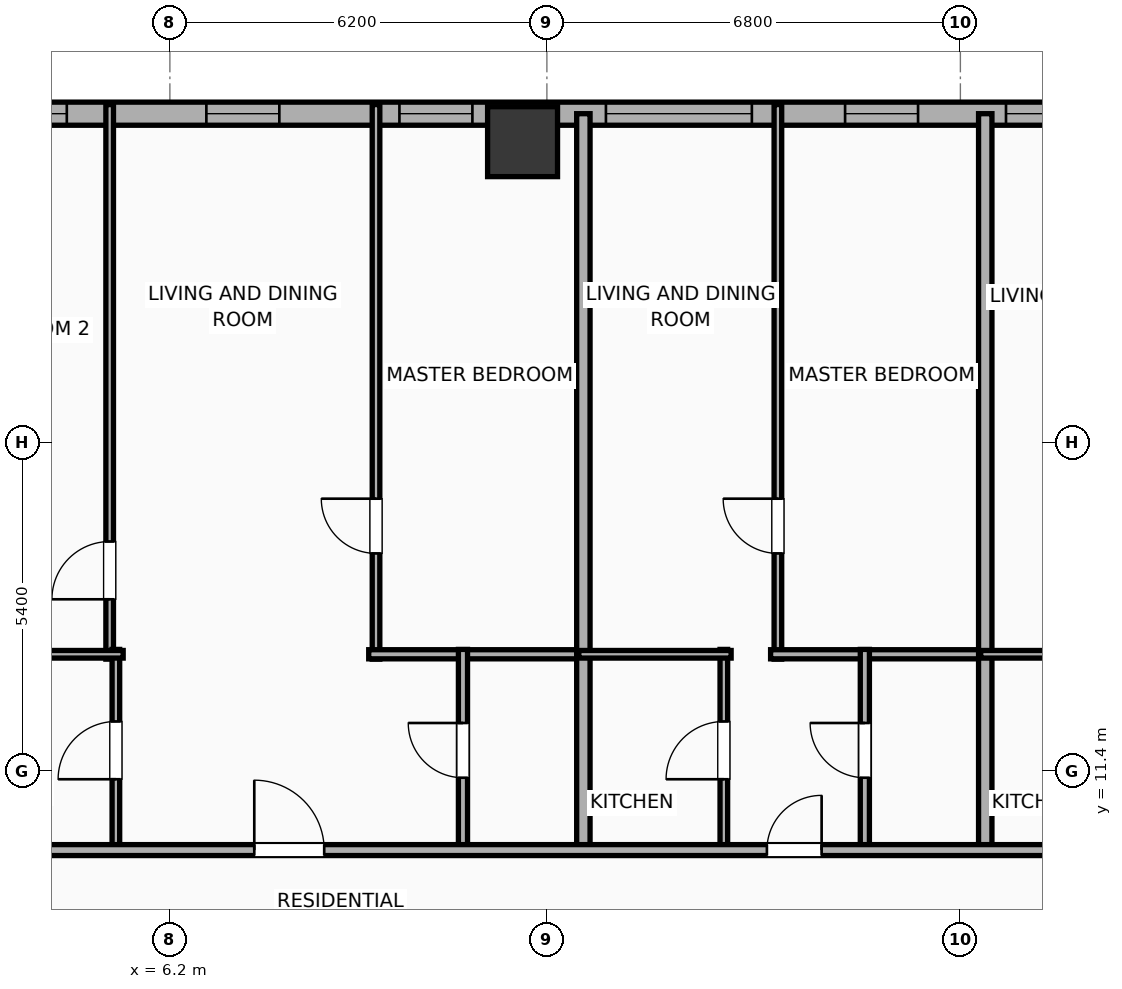
"""IFC4 building model, lengths in metres.
Left out: names, types, materials, properties, quantities, classifications, styles, units other than length and angle.
Written with IfcOpenShell. Run it as: python <this file> out.ifc"""

import sys

from ifc_helpers import new_model, si_unit, direction, frame, frame_2d, origin, origin_2d, place, context, subcontext, project, spatial, rectangle, hollow_rectangle, extrude, element, fill, save


model = new_model("IFC4")
c1 = context("Model", 3, precision=1e-05, world=origin(), true_north=direction((0.0, 1.0)))
c2 = subcontext(c1, "Body", "Model", "MODEL_VIEW")
j1 = project(units=[si_unit("LENGTHUNIT", "METRE"), si_unit("PLANEANGLEUNIT", "RADIAN")], contexts=[c1])
p1 = place(None, origin())
s1 = spatial("IfcSite", under=j1, at=p1, CompositionType="ELEMENT")
p2 = place(p1, origin())
s2 = spatial("IfcBuilding", under=s1, at=p2, CompositionType="ELEMENT")
p3 = place(p2, frame((0.0, 0.0, 41.6)))
s3 = spatial("IfcBuildingStorey", under=s2, at=p3, CompositionType="ELEMENT", Elevation=41.6)
p4 = place(p3, frame((12.0, 21.75, 0.0), z_axis=(0.0, 0.0, 1.0), x_axis=(1.0, 0.0, 0.0)))
e1 = element("IfcColumn", 1, at=p4, inside=s3, PredefinedType="COLUMN", context=c2, shape_type="SweptSolid", body=[
    extrude(hollow_rectangle(XDim=1.15, YDim=1.15, WallThickness=0.04, at=origin_2d()), origin(), (0.0, 0.0, 1.0), 3.9),
])
p5 = place(p3, frame((-29.581, 22.21, 0.0), z_axis=(0.0, 0.0, 1.0), x_axis=(1.0, 0.0, 0.0)))
e2 = element("IfcWall", 2, at=p5, inside=s3, PredefinedType="ELEMENTEDWALL", context=c2, shape_type="SweptSolid", body=[
    extrude(rectangle(XDim=51.963, YDim=0.38, at=frame_2d((25.981, 0.0))), origin(), (0.0, 0.0, 1.0), 3.65),
])
p6 = place(p5, frame((25.631, 0.0, 0.75)))
e3 = element("IfcOpeningElement", 3, at=p6, cuts=e2, PredefinedType="OPENING", context=c2, shape_type="SweptSolid", body=[
    extrude(rectangle(XDim=2.4, YDim=2.1, at=frame_2d((1.2, 1.05))), frame((0.0, 0.2, 0.0), z_axis=(0.0, -1.0, 0.0), x_axis=(1.0, 0.0, 0.0)), (0.0, 0.0, 1.0), 0.4),
])
p7 = place(p5, frame((42.952, 0.0, 0.75)))
e4 = element("IfcOpeningElement", 4, at=p7, cuts=e2, PredefinedType="OPENING", context=c2, shape_type="SweptSolid", body=[
    extrude(rectangle(XDim=2.4, YDim=2.1, at=frame_2d((1.2, 1.05))), frame((0.0, 0.2, 0.0), z_axis=(0.0, -1.0, 0.0), x_axis=(1.0, 0.0, 0.0)), (0.0, 0.0, 1.0), 0.4),
])
p8 = place(p5, frame((1.731, 0.0, 0.75)))
e5 = element("IfcOpeningElement", 5, at=p8, cuts=e2, PredefinedType="OPENING", context=c2, shape_type="SweptSolid", body=[
    extrude(rectangle(XDim=1.2, YDim=2.05, at=frame_2d((0.6, 1.025))), frame((0.0, 0.2, 0.0), z_axis=(0.0, -1.0, 0.0), x_axis=(1.0, 0.0, 0.0)), (0.0, 0.0, 1.0), 0.4),
])
p9 = place(p5, frame((5.272, 0.0, 0.75)))
e6 = element("IfcOpeningElement", 6, at=p9, cuts=e2, PredefinedType="OPENING", context=c2, shape_type="SweptSolid", body=[
    extrude(rectangle(XDim=1.2, YDim=2.05, at=frame_2d((0.6, 1.025))), frame((0.0, 0.2, 0.0), z_axis=(0.0, -1.0, 0.0), x_axis=(1.0, 0.0, 0.0)), (0.0, 0.0, 1.0), 0.4),
])
p10 = place(p5, frame((8.356, 0.0, 0.75)))
e7 = element("IfcOpeningElement", 7, at=p10, cuts=e2, PredefinedType="OPENING", context=c2, shape_type="SweptSolid", body=[
    extrude(rectangle(XDim=1.2, YDim=2.05, at=frame_2d((0.6, 1.025))), frame((0.0, 0.2, 0.0), z_axis=(0.0, -1.0, 0.0), x_axis=(1.0, 0.0, 0.0)), (0.0, 0.0, 1.0), 0.4),
])
p11 = place(p5, frame((15.632, 0.0, 0.75)))
e8 = element("IfcOpeningElement", 8, at=p11, cuts=e2, PredefinedType="OPENING", context=c2, shape_type="SweptSolid", body=[
    extrude(rectangle(XDim=1.2, YDim=2.05, at=frame_2d((0.6, 1.025))), frame((0.0, 0.2, 0.0), z_axis=(0.0, -1.0, 0.0), x_axis=(1.0, 0.0, 0.0)), (0.0, 0.0, 1.0), 0.4),
])
p12 = place(p5, frame((12.137, 0.0, 0.75)))
e9 = element("IfcOpeningElement", 9, at=p12, cuts=e2, PredefinedType="OPENING", context=c2, shape_type="SweptSolid", body=[
    extrude(rectangle(XDim=1.2, YDim=2.05, at=frame_2d((0.6, 1.025))), frame((0.0, 0.2, 0.0), z_axis=(0.0, -1.0, 0.0), x_axis=(1.0, 0.0, 0.0)), (0.0, 0.0, 1.0), 0.4),
])
p13 = place(p5, frame((18.756, 0.0, 0.75)))
e10 = element("IfcOpeningElement", 10, at=p13, cuts=e2, PredefinedType="OPENING", context=c2, shape_type="SweptSolid", body=[
    extrude(rectangle(XDim=1.2, YDim=2.05, at=frame_2d((0.6, 1.025))), frame((0.0, 0.2, 0.0), z_axis=(0.0, -1.0, 0.0), x_axis=(1.0, 0.0, 0.0)), (0.0, 0.0, 1.0), 0.4),
])
p14 = place(p5, frame((22.907, 0.0, 0.75)))
e11 = element("IfcOpeningElement", 11, at=p14, cuts=e2, PredefinedType="OPENING", context=c2, shape_type="SweptSolid", body=[
    extrude(rectangle(XDim=1.2, YDim=2.05, at=frame_2d((0.6, 1.025))), frame((0.0, 0.2, 0.0), z_axis=(0.0, -1.0, 0.0), x_axis=(1.0, 0.0, 0.0)), (0.0, 0.0, 1.0), 0.4),
])
p15 = place(p5, frame((36.381, 0.0, 0.75)))
e12 = element("IfcOpeningElement", 12, at=p15, cuts=e2, PredefinedType="OPENING", context=c2, shape_type="SweptSolid", body=[
    extrude(rectangle(XDim=1.2, YDim=2.05, at=frame_2d((0.6, 1.025))), frame((0.0, 0.2, 0.0), z_axis=(0.0, -1.0, 0.0), x_axis=(1.0, 0.0, 0.0)), (0.0, 0.0, 1.0), 0.4),
])
p16 = place(p5, frame((32.886, 0.0, 0.75)))
e13 = element("IfcOpeningElement", 13, at=p16, cuts=e2, PredefinedType="OPENING", context=c2, shape_type="SweptSolid", body=[
    extrude(rectangle(XDim=1.2, YDim=2.05, at=frame_2d((0.6, 1.025))), frame((0.0, 0.2, 0.0), z_axis=(0.0, -1.0, 0.0), x_axis=(1.0, 0.0, 0.0)), (0.0, 0.0, 1.0), 0.4),
])
p17 = place(p5, frame((39.556, 0.0, 0.75)))
e14 = element("IfcOpeningElement", 14, at=p17, cuts=e2, PredefinedType="OPENING", context=c2, shape_type="SweptSolid", body=[
    extrude(rectangle(XDim=1.2, YDim=2.05, at=frame_2d((0.6, 1.025))), frame((0.0, 0.2, 0.0), z_axis=(0.0, -1.0, 0.0), x_axis=(1.0, 0.0, 0.0)), (0.0, 0.0, 1.0), 0.4),
])
p18 = place(p5, frame((46.885, 0.0, 0.75)))
e15 = element("IfcOpeningElement", 15, at=p18, cuts=e2, PredefinedType="OPENING", context=c2, shape_type="SweptSolid", body=[
    extrude(rectangle(XDim=1.2, YDim=2.05, at=frame_2d((0.6, 1.025))), frame((0.0, 0.2, 0.0), z_axis=(0.0, -1.0, 0.0), x_axis=(1.0, 0.0, 0.0)), (0.0, 0.0, 1.0), 0.4),
])
p19 = place(p5, frame((49.531, 0.0, 0.75)))
e16 = element("IfcOpeningElement", 16, at=p19, cuts=e2, PredefinedType="OPENING", context=c2, shape_type="SweptSolid", body=[
    extrude(rectangle(XDim=1.2, YDim=2.05, at=frame_2d((0.6, 1.025))), frame((0.0, 0.2, 0.0), z_axis=(0.0, -1.0, 0.0), x_axis=(1.0, 0.0, 0.0)), (0.0, 0.0, 1.0), 0.4),
])
p20 = place(p3, frame((5.21, 13.24, 0.0), z_axis=(0.0, 0.0, 1.0), x_axis=(0.0, 1.0, 0.0)))
e17 = element("IfcWall", 17, at=p20, inside=s3, PredefinedType="PARTITIONING", context=c2, shape_type="SweptSolid", body=[
    extrude(rectangle(XDim=9.12, YDim=0.125, at=frame_2d((4.56, 0.0))), origin(), (0.0, 0.0, 1.0), 3.65),
])
p21 = place(p20, frame((0.984, 0.0, 0.0)))
e18 = element("IfcOpeningElement", 18, at=p21, cuts=e17, PredefinedType="OPENING", context=c2, shape_type="SweptSolid", body=[
    extrude(rectangle(XDim=0.95, YDim=2.05, at=frame_2d((0.475, 1.025))), frame((0.0, 0.073, 0.0), z_axis=(0.0, -1.0, 0.0), x_axis=(1.0, 0.0, 0.0)), (0.0, 0.0, 1.0), 0.145),
])
p22 = place(p3, frame((9.59, 13.24, 0.0), z_axis=(0.0, 0.0, 1.0), x_axis=(0.0, 1.0, 0.0)))
e19 = element("IfcWall", 19, at=p22, inside=s3, PredefinedType="PARTITIONING", context=c2, shape_type="SweptSolid", body=[
    extrude(rectangle(XDim=9.12, YDim=0.125, at=frame_2d((4.56, 0.0))), origin(), (0.0, 0.0, 1.0), 3.65),
])
p23 = place(p22, frame((1.739, 0.0, 0.0)))
e20 = element("IfcOpeningElement", 20, at=p23, cuts=e19, PredefinedType="OPENING", context=c2, shape_type="SweptSolid", body=[
    extrude(rectangle(XDim=0.9, YDim=2.05, at=frame_2d((0.45, 1.025))), frame((0.0, 0.073, 0.0), z_axis=(0.0, -1.0, 0.0), x_axis=(1.0, 0.0, 0.0)), (0.0, 0.0, 1.0), 0.145),
])
p24 = place(p3, frame((9.47, 13.32, 0.0), z_axis=(0.0, 0.0, 1.0), x_axis=(1.0, 0.0, 0.0)))
e21 = element("IfcWall", 21, at=p24, inside=s3, PredefinedType="PLUMBINGWALL", context=c2, shape_type="SweptSolid", body=[
    extrude(rectangle(XDim=3.605, YDim=0.15, at=frame_2d((1.802, 0.0))), origin(), (0.0, 0.0, 1.0), 3.65),
])
p25 = place(p3, frame((5.312, 10.08, 0.0), z_axis=(0.0, 0.0, 1.0), x_axis=(0.0, 1.0, 0.0)))
e22 = element("IfcWall", 22, at=p25, inside=s3, PredefinedType="PARTITIONING", context=c2, shape_type="SweptSolid", body=[
    extrude(rectangle(XDim=3.32, YDim=0.125, at=frame_2d((1.66, 0.0))), origin(), (0.0, 0.0, 1.0), 3.65),
])
p26 = place(p25, frame((1.185, 0.0, 0.0)))
e23 = element("IfcOpeningElement", 23, at=p26, cuts=e22, PredefinedType="OPENING", context=c2, shape_type="SweptSolid", body=[
    extrude(rectangle(XDim=0.95, YDim=2.05, at=frame_2d((0.475, 1.025))), frame((0.0, 0.073, 0.0), z_axis=(0.0, -1.0, 0.0), x_axis=(1.0, 0.0, 0.0)), (0.0, 0.0, 1.0), 0.145),
])
p27 = place(p3, frame((2.34, 13.32, 0.0), z_axis=(0.0, 0.0, 1.0), x_axis=(1.0, 0.0, 0.0)))
e24 = element("IfcWall", 24, at=p27, inside=s3, PredefinedType="PARTITIONING", context=c2, shape_type="SweptSolid", body=[
    extrude(rectangle(XDim=3.092, YDim=0.125, at=frame_2d((1.546, 0.0))), origin(), (0.0, 0.0, 1.0), 3.65),
])
p28 = place(p3, frame((11.02, 10.08, 0.0), z_axis=(0.0, 0.0, 1.0), x_axis=(0.0, 1.0, 0.0)))
e25 = element("IfcWall", 25, at=p28, inside=s3, PredefinedType="PLUMBINGWALL", context=c2, shape_type="SweptSolid", body=[
    extrude(rectangle(XDim=3.32, YDim=0.15, at=frame_2d((1.66, 0.0))), origin(), (0.0, 0.0, 1.0), 3.65),
])
p29 = place(p28, frame((1.21, 0.0, 0.0)))
e26 = element("IfcOpeningElement", 26, at=p29, cuts=e25, PredefinedType="OPENING", context=c2, shape_type="SweptSolid", body=[
    extrude(rectangle(XDim=0.9, YDim=2.05, at=frame_2d((0.45, 1.025))), frame((0.0, 0.085, 0.0), z_axis=(0.0, -1.0, 0.0), x_axis=(1.0, 0.0, 0.0)), (0.0, 0.0, 1.0), 0.17),
])
p30 = place(p3, frame((13.0, 10.02, 0.0), z_axis=(0.0, 0.0, 1.0), x_axis=(0.0, 1.0, 0.0)))
e27 = element("IfcWall", 27, at=p30, inside=s3, PredefinedType="PARTITIONING", context=c2, shape_type="SweptSolid", body=[
    extrude(rectangle(XDim=12.19, YDim=0.22, at=frame_2d((6.095, 0.0))), origin(), (0.0, 0.0, 1.0), 3.65),
])
p31 = place(p3, frame((16.199, 13.24, 0.0), z_axis=(0.0, 0.0, 1.0), x_axis=(0.0, 1.0, 0.0)))
e28 = element("IfcWall", 28, at=p31, inside=s3, PredefinedType="PARTITIONING", context=c2, shape_type="SweptSolid", body=[
    extrude(rectangle(XDim=9.12, YDim=0.125, at=frame_2d((4.56, 0.0))), origin(), (0.0, 0.0, 1.0), 3.65),
])
p32 = place(p31, frame((1.739, 0.0, 0.0)))
e29 = element("IfcOpeningElement", 29, at=p32, cuts=e28, PredefinedType="OPENING", context=c2, shape_type="SweptSolid", body=[
    extrude(rectangle(XDim=0.9, YDim=2.05, at=frame_2d((0.45, 1.025))), frame((0.0, 0.073, 0.0), z_axis=(0.0, -1.0, 0.0), x_axis=(1.0, 0.0, 0.0)), (0.0, 0.0, 1.0), 0.145),
])
p33 = place(p3, frame((16.079, 13.32, 0.0), z_axis=(0.0, 0.0, 1.0), x_axis=(1.0, 0.0, 0.0)))
e30 = element("IfcWall", 30, at=p33, inside=s3, PredefinedType="PLUMBINGWALL", context=c2, shape_type="SweptSolid", body=[
    extrude(rectangle(XDim=3.605, YDim=0.15, at=frame_2d((1.802, 0.0))), origin(), (0.0, 0.0, 1.0), 3.65),
])
p34 = place(p3, frame((15.31, 10.08, 0.0), z_axis=(0.0, 0.0, 1.0), x_axis=(0.0, 1.0, 0.0)))
e31 = element("IfcWall", 31, at=p34, inside=s3, PredefinedType="PARTITIONING", context=c2, shape_type="SweptSolid", body=[
    extrude(rectangle(XDim=3.32, YDim=0.125, at=frame_2d((1.66, 0.0))), origin(), (0.0, 0.0, 1.0), 3.65),
])
p35 = place(p34, frame((1.185, 0.0, 0.0)))
e32 = element("IfcOpeningElement", 32, at=p35, cuts=e31, PredefinedType="OPENING", context=c2, shape_type="SweptSolid", body=[
    extrude(rectangle(XDim=0.95, YDim=2.05, at=frame_2d((0.475, 1.025))), frame((0.0, 0.073, 0.0), z_axis=(0.0, -1.0, 0.0), x_axis=(1.0, 0.0, 0.0)), (0.0, 0.0, 1.0), 0.145),
])
p36 = place(p3, frame((12.925, 13.32, 0.0), z_axis=(0.0, 0.0, 1.0), x_axis=(1.0, 0.0, 0.0)))
e33 = element("IfcWall", 33, at=p36, inside=s3, PredefinedType="PARTITIONING", context=c2, shape_type="SweptSolid", body=[
    extrude(rectangle(XDim=2.505, YDim=0.125, at=frame_2d((1.252, 0.0))), origin(), (0.0, 0.0, 1.0), 3.65),
])
p37 = place(p3, frame((17.629, 10.08, 0.0), z_axis=(0.0, 0.0, 1.0), x_axis=(0.0, 1.0, 0.0)))
e34 = element("IfcWall", 34, at=p37, inside=s3, PredefinedType="PLUMBINGWALL", context=c2, shape_type="SweptSolid", body=[
    extrude(rectangle(XDim=3.32, YDim=0.15, at=frame_2d((1.66, 0.0))), origin(), (0.0, 0.0, 1.0), 3.65),
])
p38 = place(p37, frame((1.21, 0.0, 0.0)))
e35 = element("IfcOpeningElement", 35, at=p38, cuts=e34, PredefinedType="OPENING", context=c2, shape_type="SweptSolid", body=[
    extrude(rectangle(XDim=0.9, YDim=2.05, at=frame_2d((0.45, 1.025))), frame((0.0, 0.085, 0.0), z_axis=(0.0, -1.0, 0.0), x_axis=(1.0, 0.0, 0.0)), (0.0, 0.0, 1.0), 0.17),
])
p39 = place(p3, frame((19.609, 10.02, 0.0), z_axis=(0.0, 0.0, 1.0), x_axis=(0.0, 1.0, 0.0)))
e36 = element("IfcWall", 36, at=p39, inside=s3, PredefinedType="PARTITIONING", context=c2, shape_type="SweptSolid", body=[
    extrude(rectangle(XDim=12.19, YDim=0.22, at=frame_2d((6.095, 0.0))), origin(), (0.0, 0.0, 1.0), 3.65),
])
p40 = place(p3, frame((19.534, 13.32, 0.0), z_axis=(0.0, 0.0, 1.0), x_axis=(1.0, 0.0, 0.0)))
e37 = element("IfcWall", 37, at=p40, inside=s3, PredefinedType="PARTITIONING", context=c2, shape_type="SweptSolid", body=[
    extrude(rectangle(XDim=2.505, YDim=0.125, at=frame_2d((1.252, 0.0))), origin(), (0.0, 0.0, 1.0), 3.65),
])
p41 = place(p3, frame((-33.41, 10.1, 0.0), z_axis=(0.0, 0.0, 1.0), x_axis=(1.0, 0.0, 0.0)))
e38 = element("IfcWall", 38, at=p41, inside=s3, PredefinedType="PARTITIONING", context=c2, shape_type="SweptSolid", body=[
    extrude(rectangle(XDim=59.62, YDim=0.18, at=frame_2d((29.81, 0.0))), origin(), (0.0, 0.0, 1.0), 3.65),
])
p42 = place(p41, frame((3.354, 0.0, 0.0)))
e39 = element("IfcOpeningElement", 39, at=p42, cuts=e38, PredefinedType="OPENING", context=c2, shape_type="SweptSolid", body=[
    extrude(rectangle(XDim=1.15, YDim=2.05, at=frame_2d((0.575, 1.025))), frame((0.0, 0.1, 0.0), z_axis=(0.0, -1.0, 0.0), x_axis=(1.0, 0.0, 0.0)), (0.0, 0.0, 1.0), 0.2),
])
p43 = place(p41, frame((10.997, 0.0, 0.0)))
e40 = element("IfcOpeningElement", 40, at=p43, cuts=e38, PredefinedType="OPENING", context=c2, shape_type="SweptSolid", body=[
    extrude(rectangle(XDim=1.15, YDim=2.05, at=frame_2d((0.575, 1.025))), frame((0.0, 0.1, 0.0), z_axis=(0.0, -1.0, 0.0), x_axis=(1.0, 0.0, 0.0)), (0.0, 0.0, 1.0), 0.2),
])
p44 = place(p41, frame((20.232, 0.0, 0.0)))
e41 = element("IfcOpeningElement", 41, at=p44, cuts=e38, PredefinedType="OPENING", context=c2, shape_type="SweptSolid", body=[
    extrude(rectangle(XDim=1.15, YDim=2.05, at=frame_2d((0.575, 1.025))), frame((0.0, 0.1, 0.0), z_axis=(0.0, -1.0, 0.0), x_axis=(1.0, 0.0, 0.0)), (0.0, 0.0, 1.0), 0.2),
])
p45 = place(p41, frame((30.38, 0.0, 0.0)))
e42 = element("IfcOpeningElement", 42, at=p45, cuts=e38, PredefinedType="OPENING", context=c2, shape_type="SweptSolid", body=[
    extrude(rectangle(XDim=1.15, YDim=2.05, at=frame_2d((0.575, 1.025))), frame((0.0, 0.1, 0.0), z_axis=(0.0, -1.0, 0.0), x_axis=(1.0, 0.0, 0.0)), (0.0, 0.0, 1.0), 0.2),
])
p46 = place(p41, frame((40.998, 0.0, 0.0)))
e43 = element("IfcOpeningElement", 43, at=p46, cuts=e38, PredefinedType="OPENING", context=c2, shape_type="SweptSolid", body=[
    extrude(rectangle(XDim=1.15, YDim=2.05, at=frame_2d((0.575, 1.025))), frame((0.0, 0.1, 0.0), z_axis=(0.0, -1.0, 0.0), x_axis=(1.0, 0.0, 0.0)), (0.0, 0.0, 1.0), 0.2),
])
p47 = place(p41, frame((49.428, 0.0, 0.0)))
e44 = element("IfcOpeningElement", 44, at=p47, cuts=e38, PredefinedType="OPENING", context=c2, shape_type="SweptSolid", body=[
    extrude(rectangle(XDim=0.9, YDim=2.05, at=frame_2d((0.45, 1.025))), frame((0.0, 0.1, 0.0), z_axis=(0.0, -1.0, 0.0), x_axis=(1.0, 0.0, 0.0)), (0.0, 0.0, 1.0), 0.2),
])
p48 = place(p41, frame((56.07, 0.0, 0.0)))
e45 = element("IfcOpeningElement", 45, at=p48, cuts=e38, PredefinedType="OPENING", context=c2, shape_type="SweptSolid", body=[
    extrude(rectangle(XDim=0.9, YDim=2.05, at=frame_2d((0.45, 1.025))), frame((0.0, 0.1, 0.0), z_axis=(0.0, -1.0, 0.0), x_axis=(1.0, 0.0, 0.0)), (0.0, 0.0, 1.0), 0.2),
])
p49 = place(p7, origin())
e46 = element("IfcWindow", 46, at=p49, inside=s3, PartitioningType="SINGLE_PANEL", PredefinedType="WINDOW", context=c2, shape_type="SweptSolid", body=[
    extrude(rectangle(XDim=2.4, YDim=2.1, at=frame_2d((1.2, 1.05))), frame((0.0, 0.03, 0.0), z_axis=(0.0, -1.0, 0.0), x_axis=(1.0, 0.0, 0.0)), (0.0, 0.0, 1.0), 0.06),
])
fill(e4, e46)
p50 = place(p15, origin())
e47 = element("IfcWindow", 47, at=p50, inside=s3, PartitioningType="SINGLE_PANEL", PredefinedType="WINDOW", context=c2, shape_type="SweptSolid", body=[
    extrude(rectangle(XDim=1.2, YDim=2.05, at=frame_2d((0.6, 1.025))), frame((0.0, 0.03, 0.0), z_axis=(0.0, -1.0, 0.0), x_axis=(1.0, 0.0, 0.0)), (0.0, 0.0, 1.0), 0.06),
])
fill(e12, e47)
p51 = place(p16, origin())
e48 = element("IfcWindow", 48, at=p51, inside=s3, PartitioningType="SINGLE_PANEL", PredefinedType="WINDOW", context=c2, shape_type="SweptSolid", body=[
    extrude(rectangle(XDim=1.2, YDim=2.05, at=frame_2d((0.6, 1.025))), frame((0.0, 0.03, 0.0), z_axis=(0.0, -1.0, 0.0), x_axis=(1.0, 0.0, 0.0)), (0.0, 0.0, 1.0), 0.06),
])
fill(e13, e48)
p52 = place(p17, origin())
e49 = element("IfcWindow", 49, at=p52, inside=s3, PartitioningType="SINGLE_PANEL", PredefinedType="WINDOW", context=c2, shape_type="SweptSolid", body=[
    extrude(rectangle(XDim=1.2, YDim=2.05, at=frame_2d((0.6, 1.025))), frame((0.0, 0.03, 0.0), z_axis=(0.0, -1.0, 0.0), x_axis=(1.0, 0.0, 0.0)), (0.0, 0.0, 1.0), 0.06),
])
fill(e14, e49)
p53 = place(p18, origin())
e50 = element("IfcWindow", 50, at=p53, inside=s3, PartitioningType="SINGLE_PANEL", PredefinedType="WINDOW", context=c2, shape_type="SweptSolid", body=[
    extrude(rectangle(XDim=1.2, YDim=2.05, at=frame_2d((0.6, 1.025))), frame((0.0, 0.03, 0.0), z_axis=(0.0, -1.0, 0.0), x_axis=(1.0, 0.0, 0.0)), (0.0, 0.0, 1.0), 0.06),
])
fill(e15, e50)
p54 = place(p19, origin())
e51 = element("IfcWindow", 51, at=p54, inside=s3, PartitioningType="SINGLE_PANEL", PredefinedType="WINDOW", context=c2, shape_type="SweptSolid", body=[
    extrude(rectangle(XDim=1.2, YDim=2.05, at=frame_2d((0.6, 1.025))), frame((0.0, 0.03, 0.0), z_axis=(0.0, -1.0, 0.0), x_axis=(1.0, 0.0, 0.0)), (0.0, 0.0, 1.0), 0.06),
])
fill(e16, e51)
p55 = place(p21, origin())
e52 = element("IfcDoor", 52, at=p55, inside=s3, OperationType="SINGLE_SWING_LEFT", PredefinedType="DOOR", context=c2, shape_type="SweptSolid", body=[
    extrude(rectangle(XDim=0.95, YDim=2.05, at=frame_2d((0.475, 1.025))), frame((0.0, 0.025, 0.0), z_axis=(0.0, -1.0, 0.0), x_axis=(1.0, 0.0, 0.0)), (0.0, 0.0, 1.0), 0.05),
])
fill(e18, e52)
p56 = place(p23, origin())
e53 = element("IfcDoor", 53, at=p56, inside=s3, OperationType="SINGLE_SWING_RIGHT", PredefinedType="DOOR", context=c2, shape_type="SweptSolid", body=[
    extrude(rectangle(XDim=0.9, YDim=2.05, at=frame_2d((0.45, 1.025))), frame((0.0, 0.025, 0.0), z_axis=(0.0, -1.0, 0.0), x_axis=(1.0, 0.0, 0.0)), (0.0, 0.0, 1.0), 0.05),
])
fill(e20, e53)
p57 = place(p26, origin())
e54 = element("IfcDoor", 54, at=p57, inside=s3, OperationType="SINGLE_SWING_LEFT", PredefinedType="DOOR", context=c2, shape_type="SweptSolid", body=[
    extrude(rectangle(XDim=0.95, YDim=2.05, at=frame_2d((0.475, 1.025))), frame((0.0, 0.025, 0.0), z_axis=(0.0, -1.0, 0.0), x_axis=(1.0, 0.0, 0.0)), (0.0, 0.0, 1.0), 0.05),
])
fill(e23, e54)
p58 = place(p29, origin())
e55 = element("IfcDoor", 55, at=p58, inside=s3, OperationType="SINGLE_SWING_RIGHT", PredefinedType="DOOR", context=c2, shape_type="SweptSolid", body=[
    extrude(rectangle(XDim=0.9, YDim=2.05, at=frame_2d((0.45, 1.025))), frame((0.0, 0.025, 0.0), z_axis=(0.0, -1.0, 0.0), x_axis=(1.0, 0.0, 0.0)), (0.0, 0.0, 1.0), 0.05),
])
fill(e26, e55)
p59 = place(p32, origin())
e56 = element("IfcDoor", 56, at=p59, inside=s3, OperationType="SINGLE_SWING_RIGHT", PredefinedType="DOOR", context=c2, shape_type="SweptSolid", body=[
    extrude(rectangle(XDim=0.9, YDim=2.05, at=frame_2d((0.45, 1.025))), frame((0.0, 0.025, 0.0), z_axis=(0.0, -1.0, 0.0), x_axis=(1.0, 0.0, 0.0)), (0.0, 0.0, 1.0), 0.05),
])
fill(e29, e56)
p60 = place(p35, origin())
e57 = element("IfcDoor", 57, at=p60, inside=s3, OperationType="SINGLE_SWING_LEFT", PredefinedType="DOOR", context=c2, shape_type="SweptSolid", body=[
    extrude(rectangle(XDim=0.95, YDim=2.05, at=frame_2d((0.475, 1.025))), frame((0.0, 0.025, 0.0), z_axis=(0.0, -1.0, 0.0), x_axis=(1.0, 0.0, 0.0)), (0.0, 0.0, 1.0), 0.05),
])
fill(e32, e57)
p61 = place(p38, origin())
e58 = element("IfcDoor", 58, at=p61, inside=s3, OperationType="SINGLE_SWING_RIGHT", PredefinedType="DOOR", context=c2, shape_type="SweptSolid", body=[
    extrude(rectangle(XDim=0.9, YDim=2.05, at=frame_2d((0.45, 1.025))), frame((0.0, 0.025, 0.0), z_axis=(0.0, -1.0, 0.0), x_axis=(1.0, 0.0, 0.0)), (0.0, 0.0, 1.0), 0.05),
])
fill(e35, e58)
p62 = place(p46, origin())
e59 = element("IfcDoor", 59, at=p62, inside=s3, OperationType="SINGLE_SWING_LEFT", PredefinedType="DOOR", context=c2, shape_type="SweptSolid", body=[
    extrude(rectangle(XDim=1.15, YDim=2.05, at=frame_2d((0.575, 1.025))), frame((0.0, 0.025, 0.0), z_axis=(0.0, -1.0, 0.0), x_axis=(1.0, 0.0, 0.0)), (0.0, 0.0, 1.0), 0.05),
])
fill(e43, e59)
p63 = place(p47, origin())
e60 = element("IfcDoor", 60, at=p63, inside=s3, OperationType="SINGLE_SWING_RIGHT", PredefinedType="DOOR", context=c2, shape_type="SweptSolid", body=[
    extrude(rectangle(XDim=0.9, YDim=2.05, at=frame_2d((0.45, 1.025))), frame((0.0, 0.025, 0.0), z_axis=(0.0, -1.0, 0.0), x_axis=(1.0, 0.0, 0.0)), (0.0, 0.0, 1.0), 0.05),
])
fill(e44, e60)
save(model, sys.argv[1])
